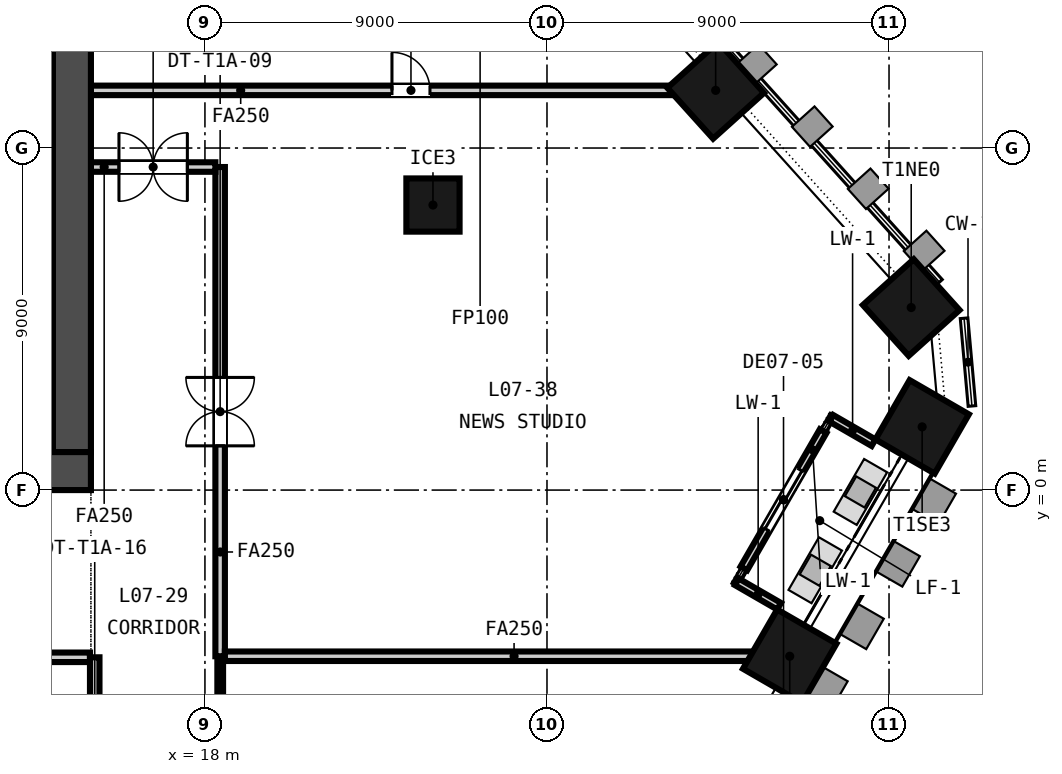
"""IFC4 building model, lengths in metres.
Left out: names, types, materials, properties, quantities, classifications, styles, units other than length and angle.
Written with IfcOpenShell. Run it as: python <this file> out.ifc"""

import sys

from ifc_helpers import new_model, si_unit, direction, frame, frame_2d, origin, origin_2d, place, context, subcontext, project, spatial, rectangle, extrude, element, fill, save


model = new_model("IFC4")
c1 = context("Model", 3, precision=1e-05, world=origin(), true_north=direction((0.0, 1.0)))
c2 = subcontext(c1, "Body", "Model", "MODEL_VIEW")
j1 = project(units=[si_unit("LENGTHUNIT", "METRE"), si_unit("PLANEANGLEUNIT", "RADIAN")], contexts=[c1])
p1 = place(None, origin())
s1 = spatial("IfcSite", under=j1, at=p1, CompositionType="ELEMENT")
p2 = place(p1, origin())
s2 = spatial("IfcBuilding", under=s1, at=p2, CompositionType="ELEMENT")
p3 = place(p2, frame((0.0, 0.0, 39.65)))
s3 = spatial("IfcBuildingStorey", under=s2, at=p3, CompositionType="ELEMENT", Elevation=39.65)
p4 = place(p3, frame((-15.0, 0.5, -0.15), z_axis=(0.0, 0.0, 1.0), x_axis=(1.0, 0.0, 0.0)))
e1 = element("IfcWall", 1, at=p4, inside=s3, PredefinedType="SOLIDWALL", context=c2, shape_type="SweptSolid", body=[
    extrude(rectangle(XDim=30.0, YDim=1.0, at=frame_2d((15.0, 0.0))), origin(), (0.0, 0.0, 1.0), 3.65),
])
p5 = place(p4, frame((5.8, 0.0, 0.15)))
e2 = element("IfcOpeningElement", 2, at=p5, cuts=e1, PredefinedType="OPENING", context=c2, shape_type="SweptSolid", body=[
    extrude(rectangle(XDim=2.4, YDim=2.4, at=frame_2d((1.2, 1.2))), frame((0.0, 0.51, 0.0), z_axis=(0.0, -1.0, 0.0), x_axis=(1.0, 0.0, 0.0)), (0.0, 0.0, 1.0), 1.02),
])
p6 = place(p4, frame((13.8, 0.0, 0.15)))
e3 = element("IfcOpeningElement", 3, at=p6, cuts=e1, PredefinedType="OPENING", context=c2, shape_type="SweptSolid", body=[
    extrude(rectangle(XDim=2.4, YDim=2.4, at=frame_2d((1.2, 1.2))), frame((0.0, 0.51, 0.0), z_axis=(0.0, -1.0, 0.0), x_axis=(1.0, 0.0, 0.0)), (0.0, 0.0, 1.0), 1.02),
])
p7 = place(p4, frame((21.8, 0.0, 0.15)))
e4 = element("IfcOpeningElement", 4, at=p7, cuts=e1, PredefinedType="OPENING", context=c2, shape_type="SweptSolid", body=[
    extrude(rectangle(XDim=2.4, YDim=2.4, at=frame_2d((1.2, 1.2))), frame((0.0, 0.51, 0.0), z_axis=(0.0, -1.0, 0.0), x_axis=(1.0, 0.0, 0.0)), (0.0, 0.0, 1.0), 1.02),
])
p8 = place(p4, frame((1.5, 0.0, 0.15)))
e5 = element("IfcOpeningElement", 5, at=p8, cuts=e1, PredefinedType="OPENING", context=c2, shape_type="SweptSolid", body=[
    extrude(rectangle(XDim=1.2, YDim=2.1, at=frame_2d((0.6, 1.05))), frame((0.0, 0.51, 0.0), z_axis=(0.0, -1.0, 0.0), x_axis=(1.0, 0.0, 0.0)), (0.0, 0.0, 1.0), 1.02),
])
p9 = place(p4, frame((27.3, 0.0, 0.15)))
e6 = element("IfcOpeningElement", 6, at=p9, cuts=e1, PredefinedType="OPENING", context=c2, shape_type="SweptSolid", body=[
    extrude(rectangle(XDim=1.2, YDim=2.1, at=frame_2d((0.6, 1.05))), frame((0.0, 0.51, 0.0), z_axis=(0.0, -1.0, 0.0), x_axis=(1.0, 0.0, 0.0)), (0.0, 0.0, 1.0), 1.02),
])
p10 = place(p3, frame((14.5, 1.0, -0.15), z_axis=(0.0, 0.0, 1.0), x_axis=(0.0, 1.0, 0.0)))
e7 = element("IfcWall", 7, at=p10, inside=s3, PredefinedType="SOLIDWALL", context=c2, shape_type="SweptSolid", body=[
    extrude(rectangle(XDim=13.0, YDim=1.0, at=frame_2d((6.5, 0.0))), origin(), (0.0, 0.0, 1.0), 3.65),
])
for number, where, z_axis, x_axis in (
    (8, (33.387, -4.373, -0.15), (0.0, 0.0, 1.0), (0.5, 0.866, 0.0)),
    (9, (36.872, 1.663, -0.15), (0.0, 0.0, 1.0), (0.5, 0.866, 0.0)),
    (10, (36.584, 4.803, -0.15), (0.0, 0.0, 1.0), (-0.669, 0.743, 0.0)),
    (11, (31.438, 10.517, -0.15), (0.0, 0.0, 1.0), (-0.669, 0.743, 0.0)),
):
    element("IfcColumn", number, at=place(p3, frame(where, z_axis=z_axis, x_axis=x_axis)), inside=s3, PredefinedType="COLUMN", context=c2, shape_type="SweptSolid", body=[
        extrude(rectangle(XDim=1.8, YDim=1.8, at=origin_2d()), origin(), (0.0, 0.0, 1.0), 3.65),
    ])
p11 = place(p3, frame((24.0, 7.5, -0.15), z_axis=(0.0, 0.0, 1.0), x_axis=(1.0, 0.0, 0.0)))
e12 = element("IfcColumn", 12, at=p11, inside=s3, PredefinedType="COLUMN", context=c2, shape_type="SweptSolid", body=[
    extrude(rectangle(XDim=1.4, YDim=1.4, at=origin_2d()), origin(), (0.0, 0.0, 1.0), 3.65),
])
p12 = place(p3, frame((32.181, -2.06, 0.0), z_axis=(0.0, 0.0, 1.0), x_axis=(0.500043453909, 0.866000314205, 0.0)))
e13 = element("IfcWall", 13, at=p12, inside=s3, PredefinedType="SOLIDWALL", context=c2, shape_type="SweptSolid", body=[
    extrude(rectangle(XDim=4.17, YDim=0.2, at=frame_2d((2.085, 0.0))), origin(), (0.0, 0.0, 1.0), 2.821),
])
p13 = place(p12, frame((1.185, 0.0, 0.0)))
e14 = element("IfcOpeningElement", 14, at=p13, cuts=e13, PredefinedType="OPENING", context=c2, shape_type="SweptSolid", body=[
    extrude(rectangle(XDim=1.8, YDim=2.4, at=frame_2d((0.9, 1.2))), frame((0.0, 0.11, 0.0), z_axis=(0.0, -1.0, 0.0), x_axis=(1.0, 0.0, 0.0)), (0.0, 0.0, 1.0), 0.22),
])
for number, where, z_axis, x_axis in (
    (15, (33.107, -3.056, 0.0), (0.0, 0.0, 1.0), (-0.866, 0.5, 0.0)),
    (16, (35.592, 1.247, 0.0), (0.0, 0.0, 1.0), (-0.866, 0.5, 0.0)),
):
    element("IfcWall", number, at=place(p3, frame(where, z_axis=z_axis, x_axis=x_axis)), inside=s3, PredefinedType="SOLIDWALL", context=c2, shape_type="SweptSolid", body=[
        extrude(rectangle(XDim=1.284, YDim=0.2, at=frame_2d((0.642, 0.0))), origin(), (0.0, 0.0, 1.0), 3.05),
    ])
p14 = place(p3, frame((11.05, 7.35, -0.15), z_axis=(0.0, 0.0, 1.0), x_axis=(1.0, 0.0, 0.0)))
e17 = element("IfcWall", 17, at=p14, inside=s3, PredefinedType="SOLIDWALL", context=c2, shape_type="SweptSolid", body=[
    extrude(rectangle(XDim=2.95, YDim=0.3, at=frame_2d((1.475, 0.0))), origin(), (0.0, 0.0, 1.0), 3.65),
])
p15 = place(p3, frame((14.975, -4.4, 0.0), z_axis=(0.0, 0.0, 1.0), x_axis=(-1.0, 0.0, 0.0)))
e18 = element("IfcWall", 18, at=p15, inside=s3, PredefinedType="PARTITIONING", context=c2, shape_type="SweptSolid", body=[
    extrude(rectangle(XDim=4.783, YDim=0.25, at=frame_2d((2.392, 0.0))), origin(), (0.0, 0.0, 1.0), 2.741),
])
p16 = place(p15, frame((1.479, 0.0, 0.0)))
e19 = element("IfcOpeningElement", 19, at=p16, cuts=e18, PredefinedType="OPENING", context=c2, shape_type="SweptSolid", body=[
    extrude(rectangle(XDim=1.8, YDim=2.1, at=frame_2d((0.9, 1.05))), frame((0.0, 0.135, 0.0), z_axis=(0.0, -1.0, 0.0), x_axis=(1.0, 0.0, 0.0)), (0.0, 0.0, 1.0), 0.27),
])
p17 = place(p3, frame((18.4, 8.5, 0.0), z_axis=(0.0, 0.0, 1.0), x_axis=(0.0, -1.0, 0.0)))
e20 = element("IfcWall", 20, at=p17, inside=s3, PredefinedType="PARTITIONING", context=c2, shape_type="SweptSolid", body=[
    extrude(rectangle(XDim=12.872, YDim=0.25, at=frame_2d((6.436, 0.0))), origin(), (0.0, 0.0, 1.0), 2.741),
])
p18 = place(p17, frame((5.536, 0.0, 0.0)))
e21 = element("IfcOpeningElement", 21, at=p18, cuts=e20, PredefinedType="OPENING", context=c2, shape_type="SweptSolid", body=[
    extrude(rectangle(XDim=1.8, YDim=2.1, at=frame_2d((0.9, 1.05))), frame((0.0, 0.135, 0.0), z_axis=(0.0, -1.0, 0.0), x_axis=(1.0, 0.0, 0.0)), (0.0, 0.0, 1.0), 0.27),
])
p19 = place(p3, frame((18.402, -4.398, 0.0), z_axis=(0.0, 0.0, 1.0), x_axis=(0.0, -1.0, 0.0)))
e22 = element("IfcWall", 22, at=p19, inside=s3, PredefinedType="PARTITIONING", context=c2, shape_type="SweptSolid", body=[
    extrude(rectangle(XDim=3.952, YDim=0.15, at=frame_2d((1.976, 0.0))), origin(), (0.0, 0.0, 1.0), 2.741),
])
p20 = place(p19, frame((1.476, 0.0, 0.0)))
e23 = element("IfcOpeningElement", 23, at=p20, cuts=e22, PredefinedType="OPENING", context=c2, shape_type="SweptSolid", body=[
    extrude(rectangle(XDim=1.0, YDim=2.1, at=frame_2d((0.5, 1.05))), frame((0.0, 0.085, 0.0), z_axis=(0.0, -1.0, 0.0), x_axis=(1.0, 0.0, 0.0)), (0.0, 0.0, 1.0), 0.17),
])
p21 = place(p3, frame((15.0, 10.517, 0.0), z_axis=(0.0, 0.0, 1.0), x_axis=(1.0, 0.0, 0.0)))
e24 = element("IfcWall", 24, at=p21, inside=s3, PredefinedType="PARTITIONING", context=c2, shape_type="SweptSolid", body=[
    extrude(rectangle(XDim=16.842, YDim=0.25, at=frame_2d((8.421, 0.0))), origin(), (0.0, 0.0, 1.0), 2.741),
])
p22 = place(p21, frame((7.921, 0.0, 0.0)))
e25 = element("IfcOpeningElement", 25, at=p22, cuts=e24, PredefinedType="OPENING", context=c2, shape_type="SweptSolid", body=[
    extrude(rectangle(XDim=1.0, YDim=2.1, at=frame_2d((0.5, 1.05))), frame((0.0, 0.135, 0.0), z_axis=(0.0, -1.0, 0.0), x_axis=(1.0, 0.0, 0.0)), (0.0, 0.0, 1.0), 0.27),
])
p23 = place(p3, frame((15.0, 8.5, 0.0), z_axis=(0.0, 0.0, 1.0), x_axis=(1.0, 0.0, 0.0)))
e26 = element("IfcWall", 26, at=p23, inside=s3, PredefinedType="PARTITIONING", context=c2, shape_type="SweptSolid", body=[
    extrude(rectangle(XDim=3.275, YDim=0.25, at=frame_2d((1.637, 0.0))), origin(), (0.0, 0.0, 1.0), 2.741),
])
p24 = place(p23, frame((0.738, 0.0, 0.0)))
e27 = element("IfcOpeningElement", 27, at=p24, cuts=e26, PredefinedType="OPENING", context=c2, shape_type="SweptSolid", body=[
    extrude(rectangle(XDim=1.8, YDim=2.1, at=frame_2d((0.9, 1.05))), frame((0.0, 0.135, 0.0), z_axis=(0.0, -1.0, 0.0), x_axis=(1.0, 0.0, 0.0)), (0.0, 0.0, 1.0), 0.27),
])
p25 = place(p3, frame((18.525, -4.372, 0.0), z_axis=(0.0, 0.0, 1.0), x_axis=(1.0, 0.0, 0.0)))
e28 = element("IfcWall", 28, at=p25, inside=s3, PredefinedType="PARTITIONING", context=c2, shape_type="SweptSolid", body=[
    extrude(rectangle(XDim=15.208, YDim=0.25, at=frame_2d((7.604, 0.0))), origin(), (0.0, 0.0, 1.0), 2.741),
])
p26 = place(p3, frame((15.1, -12.275, 0.0), z_axis=(0.0, 0.0, 1.0), x_axis=(0.0, 1.0, 0.0)))
e29 = element("IfcWall", 29, at=p26, inside=s3, PredefinedType="PARTITIONING", context=c2, shape_type="SweptSolid", body=[
    extrude(rectangle(XDim=7.875, YDim=0.25, at=frame_2d((3.938, 0.0))), origin(), (0.0, 0.0, 1.0), 2.741),
])
p27 = place(p26, frame((3.038, 0.0, 0.0)))
e30 = element("IfcOpeningElement", 30, at=p27, cuts=e29, PredefinedType="OPENING", context=c2, shape_type="SweptSolid", body=[
    extrude(rectangle(XDim=1.8, YDim=2.1, at=frame_2d((0.9, 1.05))), frame((0.0, 0.135, 0.0), z_axis=(0.0, -1.0, 0.0), x_axis=(1.0, 0.0, 0.0)), (0.0, 0.0, 1.0), 0.27),
])
p28 = place(p13, origin())
e31 = element("IfcDoor", 31, at=p28, inside=s3, OperationType="SINGLE_SWING_LEFT", PredefinedType="DOOR", context=c2, shape_type="SweptSolid", body=[
    extrude(rectangle(XDim=1.8, YDim=2.4, at=frame_2d((0.9, 1.2))), frame((0.0, 0.025, 0.0), z_axis=(0.0, -1.0, 0.0), x_axis=(1.0, 0.0, 0.0)), (0.0, 0.0, 1.0), 0.05),
])
fill(e14, e31)
p29 = place(p18, origin())
e32 = element("IfcDoor", 32, at=p29, inside=s3, OperationType="DOUBLE_DOOR_DOUBLE_SWING", PredefinedType="DOOR", context=c2, shape_type="SweptSolid", body=[
    extrude(rectangle(XDim=1.8, YDim=2.1, at=frame_2d((0.9, 1.05))), frame((0.0, 0.025, 0.0), z_axis=(0.0, -1.0, 0.0), x_axis=(1.0, 0.0, 0.0)), (0.0, 0.0, 1.0), 0.05),
])
fill(e21, e32)
p30 = place(p24, origin())
e33 = element("IfcDoor", 33, at=p30, inside=s3, OperationType="DOUBLE_DOOR_DOUBLE_SWING", PredefinedType="DOOR", context=c2, shape_type="SweptSolid", body=[
    extrude(rectangle(XDim=1.8, YDim=2.1, at=frame_2d((0.9, 1.05))), frame((0.0, 0.025, 0.0), z_axis=(0.0, -1.0, 0.0), x_axis=(1.0, 0.0, 0.0)), (0.0, 0.0, 1.0), 0.05),
])
fill(e27, e33)
p31 = place(p22, origin())
e34 = element("IfcDoor", 34, at=p31, inside=s3, OperationType="SINGLE_SWING_LEFT", PredefinedType="DOOR", context=c2, shape_type="SweptSolid", body=[
    extrude(rectangle(XDim=1.0, YDim=2.1, at=frame_2d((0.5, 1.05))), frame((0.0, 0.025, 0.0), z_axis=(0.0, -1.0, 0.0), x_axis=(1.0, 0.0, 0.0)), (0.0, 0.0, 1.0), 0.05),
])
fill(e25, e34)
save(model, sys.argv[1])
